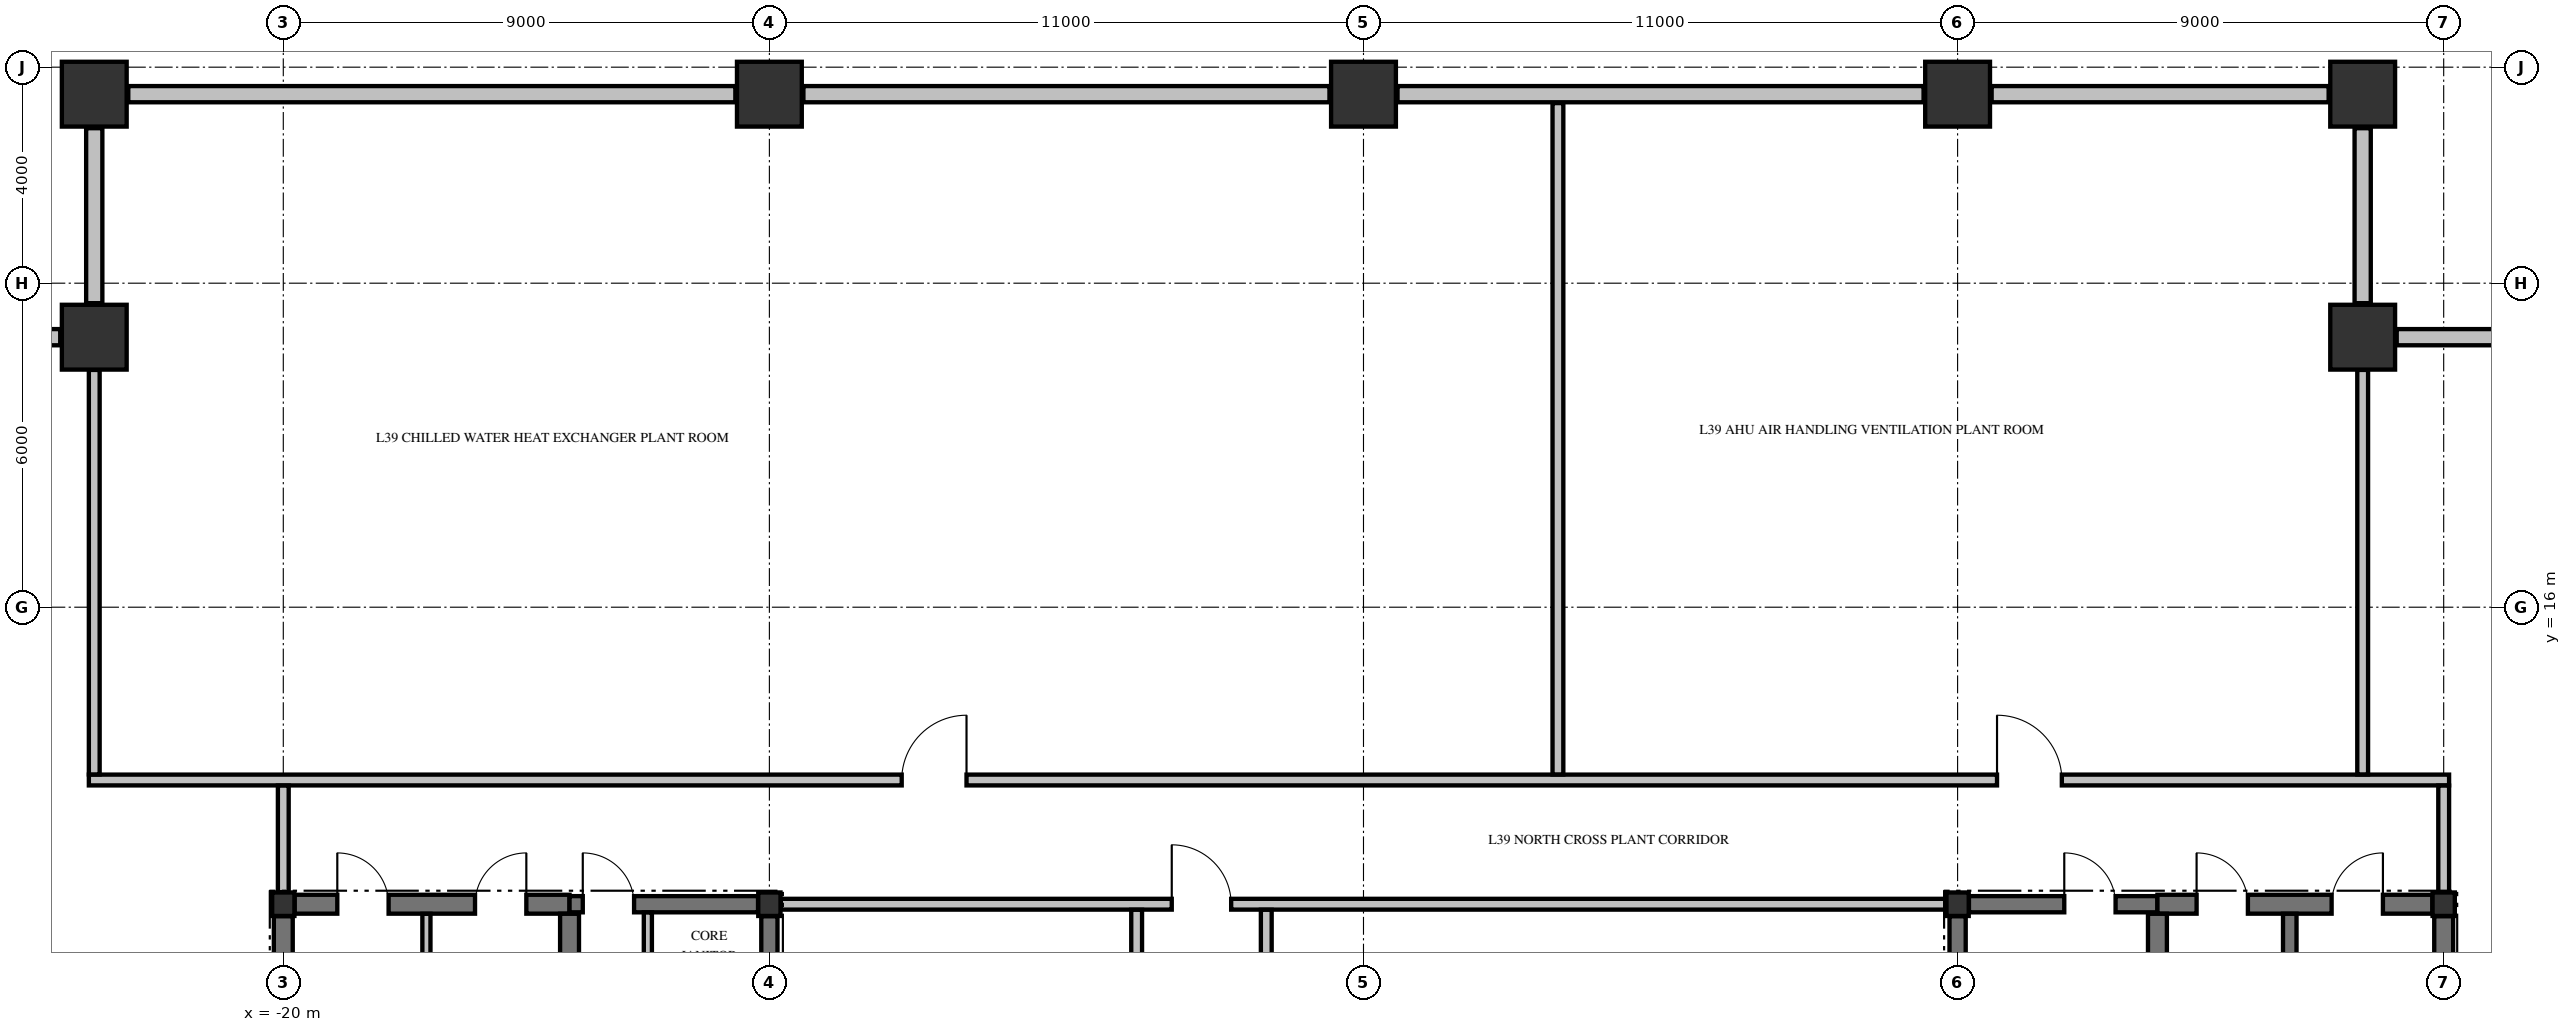
"""IFC4 building model, lengths in metres.
Left out: names, types, materials, properties, quantities, classifications, styles, units other than length and angle.
Written with IfcOpenShell. Run it as: python <this file> out.ifc"""

import sys

from ifc_helpers import new_model, si_unit, direction, frame, frame_2d, origin, origin_2d, place, context, subcontext, project, spatial, rectangle, i_section, extrude, element, fill, save


model = new_model("IFC4")
c1 = context("Model", 3, precision=1e-05, world=origin(), true_north=direction((0.0, 1.0)))
c2 = subcontext(c1, "Body", "Model", "MODEL_VIEW")
j1 = project(units=[si_unit("LENGTHUNIT", "METRE"), si_unit("PLANEANGLEUNIT", "RADIAN")], contexts=[c1])
p1 = place(None, origin())
s1 = spatial("IfcSite", under=j1, at=p1, CompositionType="ELEMENT")
p2 = place(p1, origin())
s2 = spatial("IfcBuilding", under=s1, at=p2, CompositionType="ELEMENT")
p3 = place(p2, frame((0.0, 0.0, 153.48)))
s3 = spatial("IfcBuildingStorey", under=s2, at=p3, CompositionType="ELEMENT", Elevation=153.48)
for number, where, z_axis, x_axis in (
    (1, (-23.5, 25.5, -0.425), (0.0, 0.0, 1.0), (1.0, 0.0, 0.0)),
    (2, (-11.0, 25.5, -0.425), (0.0, 0.0, 1.0), (1.0, 0.0, 0.0)),
    (3, (0.0, 25.5, -0.425), (0.0, 0.0, 1.0), (1.0, 0.0, 0.0)),
    (4, (11.0, 25.5, -0.425), (0.0, 0.0, 1.0), (1.0, 0.0, 0.0)),
    (5, (18.5, 25.5, -0.425), (0.0, 0.0, 1.0), (1.0, 0.0, 0.0)),
    (6, (18.5, 21.0, -0.425), (0.0, 0.0, 1.0), (1.0, 0.0, 0.0)),
    (7, (-23.5, 21.0, -0.425), (0.0, 0.0, 1.0), (1.0, 0.0, 0.0)),
):
    element("IfcColumn", number, at=place(p3, frame(where, z_axis=z_axis, x_axis=x_axis)), inside=s3, PredefinedType="COLUMN", context=c2, shape_type="SweptSolid", body=[
        extrude(rectangle(XDim=1.2, YDim=1.2, at=origin_2d()), origin(), (0.0, 0.0, 1.0), 4.76),
    ])
for number, where, z_axis, x_axis in (
    (8, (-20.0, 10.5, -0.425), (0.0, 0.0, 1.0), (1.0, 0.0, 0.0)),
    (9, (-11.0, 10.5, -0.425), (0.0, 0.0, 1.0), (1.0, 0.0, 0.0)),
    (10, (11.0, 10.5, -0.425), (0.0, 0.0, 1.0), (1.0, 0.0, 0.0)),
    (11, (20.0, 10.5, -0.425), (0.0, 0.0, 1.0), (1.0, 0.0, 0.0)),
):
    element("IfcColumn", number, at=place(p3, frame(where, z_axis=z_axis, x_axis=x_axis)), inside=s3, PredefinedType="COLUMN", context=c2, shape_type="SweptSolid", body=[
        extrude(i_section(OverallWidth=0.412, OverallDepth=0.435, WebThickness=0.036, FlangeThickness=0.058, FilletRadius=0.015, at=origin_2d()), origin(), (0.0, 0.0, 1.0), 4.76),
    ])
p4 = place(p3, frame((22.37, 21.0, 0.0), z_axis=(0.0, 0.0, 1.0), x_axis=(-1.0, 0.0, 0.0)))
e12 = element("IfcWall", 12, at=p4, inside=s3, PredefinedType="STANDARD", context=c2, shape_type="SweptSolid", body=[
    extrude(rectangle(XDim=3.24, YDim=0.3, at=frame_2d((1.62, 0.0))), origin(), (0.0, 0.0, 1.0), 1.927),
])
for number, where, z_axis, x_axis in (
    (13, (18.5, 21.63, 0.0), (0.0, 0.0, 1.0), (0.0, 1.0, 0.0)),
    (14, (-23.5, 24.87, 0.0), (0.0, 0.0, 1.0), (0.0, -1.0, 0.0)),
):
    element("IfcWall", number, at=place(p3, frame(where, z_axis=z_axis, x_axis=x_axis)), inside=s3, PredefinedType="STANDARD", context=c2, shape_type="SweptSolid", body=[
        extrude(rectangle(XDim=3.24, YDim=0.3, at=frame_2d((1.62, 0.0))), origin(), (0.0, 0.0, 1.0), 2.527),
    ])
p5 = place(p3, frame((-24.13, 21.0, 0.0), z_axis=(0.0, 0.0, 1.0), x_axis=(-1.0, 0.0, 0.0)))
e15 = element("IfcWall", 15, at=p5, inside=s3, PredefinedType="STANDARD", context=c2, shape_type="SweptSolid", body=[
    extrude(rectangle(XDim=3.24, YDim=0.3, at=frame_2d((1.62, 0.0))), origin(), (0.0, 0.0, 1.0), 1.927),
])
p6 = place(p3, frame((-11.63, 25.5, 0.0), z_axis=(0.0, 0.0, 1.0), x_axis=(-1.0, 0.0, 0.0)))
e16 = element("IfcWall", 16, at=p6, inside=s3, PredefinedType="STANDARD", context=c2, shape_type="SweptSolid", body=[
    extrude(rectangle(XDim=11.24, YDim=0.3, at=frame_2d((5.62, 0.0))), origin(), (0.0, 0.0, 1.0), 1.927),
])
for number, where, z_axis, x_axis in (
    (17, (-0.63, 25.5, 0.0), (0.0, 0.0, 1.0), (-1.0, 0.0, 0.0)),
    (18, (10.37, 25.5, 0.0), (0.0, 0.0, 1.0), (-1.0, 0.0, 0.0)),
):
    element("IfcWall", number, at=place(p3, frame(where, z_axis=z_axis, x_axis=x_axis)), inside=s3, PredefinedType="STANDARD", context=c2, shape_type="SweptSolid", body=[
        extrude(rectangle(XDim=9.74, YDim=0.3, at=frame_2d((4.87, 0.0))), origin(), (0.0, 0.0, 1.0), 1.927),
    ])
p7 = place(p3, frame((17.87, 25.5, 0.0), z_axis=(0.0, 0.0, 1.0), x_axis=(-1.0, 0.0, 0.0)))
e19 = element("IfcWall", 19, at=p7, inside=s3, PredefinedType="STANDARD", context=c2, shape_type="SweptSolid", body=[
    extrude(rectangle(XDim=6.24, YDim=0.3, at=frame_2d((3.12, 0.0))), origin(), (0.0, 0.0, 1.0), 1.927),
])
p8 = place(p3, frame((-19.79, 10.5, 0.0), z_axis=(0.0, 0.0, 1.0), x_axis=(1.0, 0.0, 0.0)))
e20 = element("IfcWall", 20, at=p8, inside=s3, PredefinedType="SHEAR", context=c2, shape_type="SweptSolid", body=[
    extrude(rectangle(XDim=5.09, YDim=0.35, at=frame_2d((2.545, 0.0))), origin(), (0.0, 0.0, 1.0), 4.335),
])
p9 = place(p8, frame((0.79, 0.0, 0.0)))
e21 = element("IfcOpeningElement", 21, at=p9, cuts=e20, PredefinedType="OPENING", context=c2, shape_type="SweptSolid", body=[
    extrude(rectangle(XDim=0.95, YDim=2.02, at=frame_2d((0.475, 1.01))), frame((0.0, 0.185, 0.0), z_axis=(0.0, -1.0, 0.0), x_axis=(1.0, 0.0, 0.0)), (0.0, 0.0, 1.0), 0.37),
])
p10 = place(p8, frame((3.34, 0.0, 0.0)))
e22 = element("IfcOpeningElement", 22, at=p10, cuts=e20, PredefinedType="OPENING", context=c2, shape_type="SweptSolid", body=[
    extrude(rectangle(XDim=0.95, YDim=2.02, at=frame_2d((0.475, 1.01))), frame((0.0, 0.185, 0.0), z_axis=(0.0, -1.0, 0.0), x_axis=(1.0, 0.0, 0.0)), (0.0, 0.0, 1.0), 0.37),
])
p11 = place(p3, frame((-14.7, 10.5, 0.0), z_axis=(0.0, 0.0, 1.0), x_axis=(1.0, 0.0, 0.0)))
e23 = element("IfcWall", 23, at=p11, inside=s3, PredefinedType="SHEAR", context=c2, shape_type="SweptSolid", body=[
    extrude(rectangle(XDim=3.49, YDim=0.3, at=frame_2d((1.745, 0.0))), origin(), (0.0, 0.0, 1.0), 4.335),
])
p12 = place(p11, frame((0.245, 0.0, 0.0)))
e24 = element("IfcOpeningElement", 24, at=p12, cuts=e23, PredefinedType="OPENING", context=c2, shape_type="SweptSolid", body=[
    extrude(rectangle(XDim=0.95, YDim=2.02, at=frame_2d((0.475, 1.01))), frame((0.0, 0.16, 0.0), z_axis=(0.0, -1.0, 0.0), x_axis=(1.0, 0.0, 0.0)), (0.0, 0.0, 1.0), 0.32),
])
p13 = place(p3, frame((11.21, 10.5, 0.0), z_axis=(0.0, 0.0, 1.0), x_axis=(1.0, 0.0, 0.0)))
e25 = element("IfcWall", 25, at=p13, inside=s3, PredefinedType="SHEAR", context=c2, shape_type="SweptSolid", body=[
    extrude(rectangle(XDim=3.49, YDim=0.3, at=frame_2d((1.745, 0.0))), origin(), (0.0, 0.0, 1.0), 4.335),
])
p14 = place(p13, frame((1.765, 0.0, 0.0)))
e26 = element("IfcOpeningElement", 26, at=p14, cuts=e25, PredefinedType="OPENING", context=c2, shape_type="SweptSolid", body=[
    extrude(rectangle(XDim=0.95, YDim=2.02, at=frame_2d((0.475, 1.01))), frame((0.0, 0.16, 0.0), z_axis=(0.0, -1.0, 0.0), x_axis=(1.0, 0.0, 0.0)), (0.0, 0.0, 1.0), 0.32),
])
p15 = place(p3, frame((14.7, 10.5, 0.0), z_axis=(0.0, 0.0, 1.0), x_axis=(1.0, 0.0, 0.0)))
e27 = element("IfcWall", 27, at=p15, inside=s3, PredefinedType="SHEAR", context=c2, shape_type="SweptSolid", body=[
    extrude(rectangle(XDim=5.09, YDim=0.35, at=frame_2d((2.545, 0.0))), origin(), (0.0, 0.0, 1.0), 4.335),
])
p16 = place(p15, frame((0.725, 0.0, 0.0)))
e28 = element("IfcOpeningElement", 28, at=p16, cuts=e27, PredefinedType="OPENING", context=c2, shape_type="SweptSolid", body=[
    extrude(rectangle(XDim=0.95, YDim=2.02, at=frame_2d((0.475, 1.01))), frame((0.0, 0.185, 0.0), z_axis=(0.0, -1.0, 0.0), x_axis=(1.0, 0.0, 0.0)), (0.0, 0.0, 1.0), 0.37),
])
p17 = place(p15, frame((3.225, 0.0, 0.0)))
e29 = element("IfcOpeningElement", 29, at=p17, cuts=e27, PredefinedType="OPENING", context=c2, shape_type="SweptSolid", body=[
    extrude(rectangle(XDim=0.95, YDim=2.02, at=frame_2d((0.475, 1.01))), frame((0.0, 0.185, 0.0), z_axis=(0.0, -1.0, 0.0), x_axis=(1.0, 0.0, 0.0)), (0.0, 0.0, 1.0), 0.37),
])
p18 = place(p3, frame((-10.788, 10.5, 0.0), z_axis=(0.0, 0.0, 1.0), x_axis=(1.0, 0.0, 0.0)))
e30 = element("IfcWall", 30, at=p18, inside=s3, PredefinedType="PARTITIONING", context=c2, shape_type="SweptSolid", body=[
    extrude(rectangle(XDim=21.576, YDim=0.2, at=frame_2d((10.788, 0.0))), origin(), (0.0, 0.0, 1.0), 4.335),
])
p19 = place(p18, frame((7.238, 0.0, 0.0)))
e31 = element("IfcOpeningElement", 31, at=p19, cuts=e30, PredefinedType="OPENING", context=c2, shape_type="SweptSolid", body=[
    extrude(rectangle(XDim=1.1, YDim=2.15, at=frame_2d((0.55, 1.075))), frame((0.0, 0.11, 0.0), z_axis=(0.0, -1.0, 0.0), x_axis=(1.0, 0.0, 0.0)), (0.0, 0.0, 1.0), 0.22),
])
p20 = place(p3, frame((-23.6, 12.8, 0.0), z_axis=(0.0, 0.0, 1.0), x_axis=(1.0, 0.0, 0.0)))
e32 = element("IfcWall", 32, at=p20, inside=s3, PredefinedType="PARTITIONING", context=c2, shape_type="SweptSolid", body=[
    extrude(rectangle(XDim=43.7, YDim=0.2, at=frame_2d((21.85, 0.0))), origin(), (0.0, 0.0, 1.0), 4.335),
])
p21 = place(p20, frame((15.05, 0.0, 0.0)))
e33 = element("IfcOpeningElement", 33, at=p21, cuts=e32, PredefinedType="OPENING", context=c2, shape_type="SweptSolid", body=[
    extrude(rectangle(XDim=1.2, YDim=2.15, at=frame_2d((0.6, 1.075))), frame((0.0, 0.11, 0.0), z_axis=(0.0, -1.0, 0.0), x_axis=(1.0, 0.0, 0.0)), (0.0, 0.0, 1.0), 0.22),
])
p22 = place(p20, frame((35.33, 0.0, 0.0)))
e34 = element("IfcOpeningElement", 34, at=p22, cuts=e32, PredefinedType="OPENING", context=c2, shape_type="SweptSolid", body=[
    extrude(rectangle(XDim=1.2, YDim=2.15, at=frame_2d((0.6, 1.075))), frame((0.0, 0.11, 0.0), z_axis=(0.0, -1.0, 0.0), x_axis=(1.0, 0.0, 0.0)), (0.0, 0.0, 1.0), 0.22),
])
p23 = place(p3, frame((-20.0, 0.221, 0.0), z_axis=(0.0, 0.0, 1.0), x_axis=(0.0, 1.0, 0.0)))
e35 = element("IfcWall", 35, at=p23, inside=s3, PredefinedType="SHEAR", context=c2, shape_type="SweptSolid", body=[
    extrude(rectangle(XDim=10.057, YDim=0.35, at=frame_2d((5.029, 0.0))), origin(), (0.0, 0.0, 1.0), 4.335),
])
p24 = place(p3, frame((-14.7, 5.852, 0.0), z_axis=(0.0, 0.0, 1.0), x_axis=(0.0, 1.0, 0.0)))
e36 = element("IfcWall", 36, at=p24, inside=s3, PredefinedType="SHEAR", context=c2, shape_type="SweptSolid", body=[
    extrude(rectangle(XDim=4.471, YDim=0.35, at=frame_2d((2.235, 0.0))), origin(), (0.0, 0.0, 1.0), 4.335),
])
for number, where, z_axis, x_axis in (
    (37, (-11.0, 5.852, 0.0), (0.0, 0.0, 1.0), (0.0, 1.0, 0.0)),
    (38, (11.0, 5.852, 0.0), (0.0, 0.0, 1.0), (0.0, 1.0, 0.0)),
):
    element("IfcWall", number, at=place(p3, frame(where, z_axis=z_axis, x_axis=x_axis)), inside=s3, PredefinedType="SHEAR", context=c2, shape_type="SweptSolid", body=[
        extrude(rectangle(XDim=4.427, YDim=0.3, at=frame_2d((2.213, 0.0))), origin(), (0.0, 0.0, 1.0), 4.335),
    ])
p25 = place(p3, frame((14.7, 5.852, 0.0), z_axis=(0.0, 0.0, 1.0), x_axis=(0.0, 1.0, 0.0)))
e39 = element("IfcWall", 39, at=p25, inside=s3, PredefinedType="SHEAR", context=c2, shape_type="SweptSolid", body=[
    extrude(rectangle(XDim=4.471, YDim=0.35, at=frame_2d((2.235, 0.0))), origin(), (0.0, 0.0, 1.0), 4.335),
])
p26 = place(p3, frame((17.15, -4.423, 0.0), z_axis=(0.0, 0.0, 1.0), x_axis=(0.0, 1.0, 0.0)))
e40 = element("IfcWall", 40, at=p26, inside=s3, PredefinedType="SOLIDWALL", context=c2, shape_type="SweptSolid", body=[
    extrude(rectangle(XDim=14.746, YDim=0.25, at=frame_2d((7.373, 0.0))), origin(), (0.0, 0.0, 1.0), 4.335),
])
p27 = place(p3, frame((20.0, 0.221, 0.0), z_axis=(0.0, 0.0, 1.0), x_axis=(0.0, 1.0, 0.0)))
e41 = element("IfcWall", 41, at=p27, inside=s3, PredefinedType="SHEAR", context=c2, shape_type="SweptSolid", body=[
    extrude(rectangle(XDim=10.057, YDim=0.35, at=frame_2d((5.029, 0.0))), origin(), (0.0, 0.0, 1.0), 4.335),
])
p28 = place(p3, frame((-23.5, 12.903, 0.0), z_axis=(0.0, 0.0, 1.0), x_axis=(0.0, 1.0, 0.0)))
e42 = element("IfcWall", 42, at=p28, inside=s3, PredefinedType="PARTITIONING", context=c2, shape_type="SweptSolid", body=[
    extrude(rectangle(XDim=7.491, YDim=0.2, at=frame_2d((3.746, 0.0))), origin(), (0.0, 0.0, 1.0), 4.335),
])
p29 = place(p3, frame((-20.0, 10.723, 0.0), z_axis=(0.0, 0.0, 1.0), x_axis=(0.0, 1.0, 0.0)))
e43 = element("IfcWall", 43, at=p29, inside=s3, PredefinedType="PARTITIONING", context=c2, shape_type="SweptSolid", body=[
    extrude(rectangle(XDim=1.974, YDim=0.2, at=frame_2d((0.987, 0.0))), origin(), (0.0, 0.0, 1.0), 2.127),
])
p30 = place(p3, frame((-17.35, -0.097, 0.0), z_axis=(0.0, 0.0, 1.0), x_axis=(0.0, 1.0, 0.0)))
e44 = element("IfcWall", 44, at=p30, inside=s3, PredefinedType="PARTITIONING", context=c2, shape_type="SweptSolid", body=[
    extrude(rectangle(XDim=10.419, YDim=0.15, at=frame_2d((5.209, 0.0))), origin(), (0.0, 0.0, 1.0), 4.335),
])
p31 = place(p3, frame((-13.25, 5.853, 0.0), z_axis=(0.0, 0.0, 1.0), x_axis=(0.0, 1.0, 0.0)))
e45 = element("IfcWall", 45, at=p31, inside=s3, PredefinedType="PARTITIONING", context=c2, shape_type="SweptSolid", body=[
    extrude(rectangle(XDim=4.494, YDim=0.15, at=frame_2d((2.247, 0.0))), origin(), (0.0, 0.0, 1.0), 4.335),
])
p32 = place(p31, frame((1.472, 0.0, 0.0)))
e46 = element("IfcOpeningElement", 46, at=p32, cuts=e45, PredefinedType="OPENING", context=c2, shape_type="SweptSolid", body=[
    extrude(rectangle(XDim=0.95, YDim=2.15, at=frame_2d((0.475, 1.075))), frame((0.0, 0.085, 0.0), z_axis=(0.0, -1.0, 0.0), x_axis=(1.0, 0.0, 0.0)), (0.0, 0.0, 1.0), 0.17),
])
p33 = place(p3, frame((-4.2, 6.753, 0.0), z_axis=(0.0, 0.0, 1.0), x_axis=(0.0, 1.0, 0.0)))
e47 = element("IfcWall", 47, at=p33, inside=s3, PredefinedType="PARTITIONING", context=c2, shape_type="SweptSolid", body=[
    extrude(rectangle(XDim=3.644, YDim=0.2, at=frame_2d((1.822, 0.0))), origin(), (0.0, 0.0, 1.0), 4.335),
])
p34 = place(p33, frame((0.322, 0.0, 0.0)))
e48 = element("IfcOpeningElement", 48, at=p34, cuts=e47, PredefinedType="OPENING", context=c2, shape_type="SweptSolid", body=[
    extrude(rectangle(XDim=0.95, YDim=2.15, at=frame_2d((0.475, 1.075))), frame((0.0, 0.11, 0.0), z_axis=(0.0, -1.0, 0.0), x_axis=(1.0, 0.0, 0.0)), (0.0, 0.0, 1.0), 0.22),
])
p35 = place(p3, frame((-1.8, 6.703, 0.0), z_axis=(0.0, 0.0, 1.0), x_axis=(0.0, 1.0, 0.0)))
e49 = element("IfcWall", 49, at=p35, inside=s3, PredefinedType="PARTITIONING", context=c2, shape_type="SweptSolid", body=[
    extrude(rectangle(XDim=3.694, YDim=0.2, at=frame_2d((1.847, 0.0))), origin(), (0.0, 0.0, 1.0), 4.335),
])
p36 = place(p3, frame((3.6, 12.903, 0.0), z_axis=(0.0, 0.0, 1.0), x_axis=(0.0, 1.0, 0.0)))
e50 = element("IfcWall", 50, at=p36, inside=s3, PredefinedType="PARTITIONING", context=c2, shape_type="SweptSolid", body=[
    extrude(rectangle(XDim=12.432, YDim=0.2, at=frame_2d((6.216, 0.0))), origin(), (0.0, 0.0, 1.0), 4.335),
])
p37 = place(p3, frame((18.5, 12.903, 0.0), z_axis=(0.0, 0.0, 1.0), x_axis=(0.0, 1.0, 0.0)))
e51 = element("IfcWall", 51, at=p37, inside=s3, PredefinedType="PARTITIONING", context=c2, shape_type="SweptSolid", body=[
    extrude(rectangle(XDim=7.491, YDim=0.2, at=frame_2d((3.746, 0.0))), origin(), (0.0, 0.0, 1.0), 4.335),
])
p38 = place(p3, frame((20.0, 10.723, 0.0), z_axis=(0.0, 0.0, 1.0), x_axis=(0.0, 1.0, 0.0)))
e52 = element("IfcWall", 52, at=p38, inside=s3, PredefinedType="PARTITIONING", context=c2, shape_type="SweptSolid", body=[
    extrude(rectangle(XDim=1.974, YDim=0.2, at=frame_2d((0.987, 0.0))), origin(), (0.0, 0.0, 1.0), 2.127),
])
p39 = place(p12, origin())
e53 = element("IfcDoor", 53, at=p39, inside=s3, OperationType="SINGLE_SWING_LEFT", PredefinedType="DOOR", context=c2, shape_type="SweptSolid", body=[
    extrude(rectangle(XDim=0.95, YDim=2.02, at=frame_2d((0.475, 1.01))), frame((0.0, 0.025, 0.0), z_axis=(0.0, -1.0, 0.0), x_axis=(1.0, 0.0, 0.0)), (0.0, 0.0, 1.0), 0.05),
])
fill(e24, e53)
p40 = place(p14, origin())
e54 = element("IfcDoor", 54, at=p40, inside=s3, OperationType="SINGLE_SWING_LEFT", PredefinedType="DOOR", context=c2, shape_type="SweptSolid", body=[
    extrude(rectangle(XDim=0.95, YDim=2.02, at=frame_2d((0.475, 1.01))), frame((0.0, 0.025, 0.0), z_axis=(0.0, -1.0, 0.0), x_axis=(1.0, 0.0, 0.0)), (0.0, 0.0, 1.0), 0.05),
])
fill(e26, e54)
p41 = place(p9, origin())
e55 = element("IfcDoor", 55, at=p41, inside=s3, OperationType="SINGLE_SWING_LEFT", PredefinedType="DOOR", context=c2, shape_type="SweptSolid", body=[
    extrude(rectangle(XDim=0.95, YDim=2.02, at=frame_2d((0.475, 1.01))), frame((0.0, 0.025, 0.0), z_axis=(0.0, -1.0, 0.0), x_axis=(1.0, 0.0, 0.0)), (0.0, 0.0, 1.0), 0.05),
])
fill(e21, e55)
p42 = place(p10, origin())
e56 = element("IfcDoor", 56, at=p42, inside=s3, OperationType="SINGLE_SWING_RIGHT", PredefinedType="DOOR", context=c2, shape_type="SweptSolid", body=[
    extrude(rectangle(XDim=0.95, YDim=2.02, at=frame_2d((0.475, 1.01))), frame((0.0, 0.025, 0.0), z_axis=(0.0, -1.0, 0.0), x_axis=(1.0, 0.0, 0.0)), (0.0, 0.0, 1.0), 0.05),
])
fill(e22, e56)
p43 = place(p16, origin())
e57 = element("IfcDoor", 57, at=p43, inside=s3, OperationType="SINGLE_SWING_LEFT", PredefinedType="DOOR", context=c2, shape_type="SweptSolid", body=[
    extrude(rectangle(XDim=0.95, YDim=2.02, at=frame_2d((0.475, 1.01))), frame((0.0, 0.025, 0.0), z_axis=(0.0, -1.0, 0.0), x_axis=(1.0, 0.0, 0.0)), (0.0, 0.0, 1.0), 0.05),
])
fill(e28, e57)
p44 = place(p17, origin())
e58 = element("IfcDoor", 58, at=p44, inside=s3, OperationType="SINGLE_SWING_RIGHT", PredefinedType="DOOR", context=c2, shape_type="SweptSolid", body=[
    extrude(rectangle(XDim=0.95, YDim=2.02, at=frame_2d((0.475, 1.01))), frame((0.0, 0.025, 0.0), z_axis=(0.0, -1.0, 0.0), x_axis=(1.0, 0.0, 0.0)), (0.0, 0.0, 1.0), 0.05),
])
fill(e29, e58)
p45 = place(p19, origin())
e59 = element("IfcDoor", 59, at=p45, inside=s3, OperationType="SINGLE_SWING_LEFT", PredefinedType="DOOR", context=c2, shape_type="SweptSolid", body=[
    extrude(rectangle(XDim=1.1, YDim=2.15, at=frame_2d((0.55, 1.075))), frame((0.0, 0.025, 0.0), z_axis=(0.0, -1.0, 0.0), x_axis=(1.0, 0.0, 0.0)), (0.0, 0.0, 1.0), 0.05),
])
fill(e31, e59)
p46 = place(p21, origin())
e60 = element("IfcDoor", 60, at=p46, inside=s3, OperationType="SINGLE_SWING_RIGHT", PredefinedType="DOOR", context=c2, shape_type="SweptSolid", body=[
    extrude(rectangle(XDim=1.2, YDim=2.15, at=frame_2d((0.6, 1.075))), frame((0.0, 0.025, 0.0), z_axis=(0.0, -1.0, 0.0), x_axis=(1.0, 0.0, 0.0)), (0.0, 0.0, 1.0), 0.05),
])
fill(e33, e60)
p47 = place(p22, origin())
e61 = element("IfcDoor", 61, at=p47, inside=s3, OperationType="SINGLE_SWING_LEFT", PredefinedType="DOOR", context=c2, shape_type="SweptSolid", body=[
    extrude(rectangle(XDim=1.2, YDim=2.15, at=frame_2d((0.6, 1.075))), frame((0.0, 0.025, 0.0), z_axis=(0.0, -1.0, 0.0), x_axis=(1.0, 0.0, 0.0)), (0.0, 0.0, 1.0), 0.05),
])
fill(e34, e61)
save(model, sys.argv[1])
